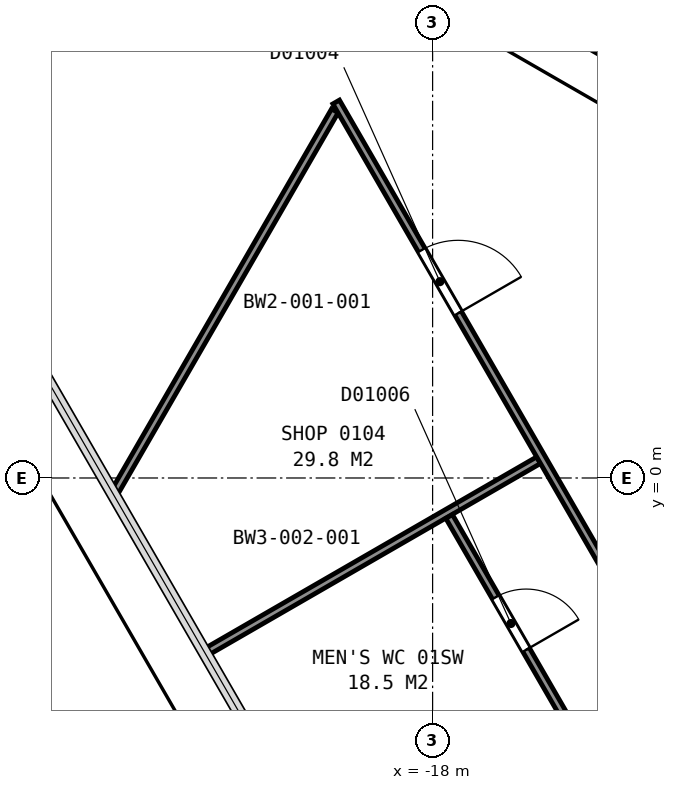
"""IFC4 building model, lengths in metres.
Left out: names, types, materials, properties, quantities, classifications, styles, units other than length and angle.
Written with IfcOpenShell. Run it as: python <this file> out.ifc"""

import sys

from ifc_helpers import new_model, si_unit, direction, frame, frame_2d, origin, place, context, subcontext, project, spatial, rectangle, extrude, element, fill, save


model = new_model("IFC4")
c1 = context("Model", 3, precision=1e-05, world=origin(), true_north=direction((0.0, 1.0)))
c2 = subcontext(c1, "Body", "Model", "MODEL_VIEW")
j1 = project(units=[si_unit("LENGTHUNIT", "METRE"), si_unit("PLANEANGLEUNIT", "RADIAN")], contexts=[c1])
p1 = place(None, origin())
s1 = spatial("IfcSite", under=j1, at=p1, CompositionType="ELEMENT")
p2 = place(p1, origin())
s2 = spatial("IfcBuilding", under=s1, at=p2, CompositionType="ELEMENT")
p3 = place(p2, frame((0.0, 0.0, 12.0)))
s3 = spatial("IfcBuildingStorey", under=s2, at=p3, CompositionType="ELEMENT", Elevation=12.0)
for number, where, z_axis, x_axis in (
    (1, (-7.678, 2.701, 0.0), (0.0, 0.0, 1.0), (-0.866, 0.5, 0.0)),
    (2, (-6.178, 5.299, 0.0), (0.0, 0.0, 1.0), (-0.866, 0.5, 0.0)),
):
    element("IfcWall", number, at=place(p3, frame(where, z_axis=z_axis, x_axis=x_axis)), inside=s3, PredefinedType="PARTITIONING", context=c2, shape_type="SweptSolid", body=[
        extrude(rectangle(XDim=12.0, YDim=0.2, at=frame_2d((6.0, 0.0))), origin(), (0.0, 0.0, 1.0), 5.15),
    ])
p4 = place(p3, frame((-23.25, -0.27, 0.0), z_axis=(0.0, 0.0, 1.0), x_axis=(0.500002873931, 0.866023744513, 0.0)))
e3 = element("IfcWall", 3, at=p4, inside=s3, PredefinedType="PARTITIONING", context=c2, shape_type="SweptSolid", body=[
    extrude(rectangle(XDim=7.285, YDim=0.125, at=frame_2d((3.643, 0.0))), origin(), (0.0, 0.0, 1.0), 5.24),
])
p5 = place(p3, frame((-21.746, -2.875, 0.0), z_axis=(0.0, 0.0, 1.0), x_axis=(0.866118237319, 0.499839173118, 0.0)))
e4 = element("IfcWall", 4, at=p5, inside=s3, PredefinedType="PARTITIONING", context=c2, shape_type="SweptSolid", body=[
    extrude(rectangle(XDim=6.337, YDim=0.125, at=frame_2d((3.169, 0.0))), origin(), (0.0, 0.0, 1.0), 4.253),
])
p6 = place(p3, frame((-4.438, -20.054, 0.0), z_axis=(0.0, 0.0, 1.0), x_axis=(-0.499994028088, 0.866028851642, 0.0)))
e5 = element("IfcWall", 5, at=p6, inside=s3, PredefinedType="PARTITIONING", context=c2, shape_type="SweptSolid", body=[
    extrude(rectangle(XDim=30.297, YDim=0.125, at=frame_2d((15.148, 0.0))), origin(), (0.0, 0.0, 1.0), 4.253),
])
p7 = place(p6, frame((26.285, 0.0, 0.0)))
e6 = element("IfcOpeningElement", 6, at=p7, cuts=e5, PredefinedType="OPENING", context=c2, shape_type="SweptSolid", body=[
    extrude(rectangle(XDim=1.2, YDim=2.1, at=frame_2d((0.6, 1.05))), frame((0.0, 0.073, 0.0), z_axis=(0.0, -1.0, 0.0), x_axis=(1.0, 0.0, 0.0)), (0.0, 0.0, 1.0), 0.145),
])
p8 = place(p6, frame((16.731, 0.0, 0.0)))
e7 = element("IfcOpeningElement", 7, at=p8, cuts=e5, PredefinedType="OPENING", context=c2, shape_type="SweptSolid", body=[
    extrude(rectangle(XDim=1.0, YDim=2.1, at=frame_2d((0.5, 1.05))), frame((0.0, 0.073, 0.0), z_axis=(0.0, -1.0, 0.0), x_axis=(1.0, 0.0, 0.0)), (0.0, 0.0, 1.0), 0.145),
])
p9 = place(p6, frame((8.257, 0.0, 0.0)))
e8 = element("IfcOpeningElement", 8, at=p9, cuts=e5, PredefinedType="OPENING", context=c2, shape_type="SweptSolid", body=[
    extrude(rectangle(XDim=1.2, YDim=2.1, at=frame_2d((0.6, 1.05))), frame((0.0, 0.073, 0.0), z_axis=(0.0, -1.0, 0.0), x_axis=(1.0, 0.0, 0.0)), (0.0, 0.0, 1.0), 0.145),
])
p10 = place(p6, frame((2.916, 0.0, 0.0)))
e9 = element("IfcOpeningElement", 9, at=p10, cuts=e5, PredefinedType="OPENING", context=c2, shape_type="SweptSolid", body=[
    extrude(rectangle(XDim=1.0, YDim=2.1, at=frame_2d((0.5, 1.05))), frame((0.0, 0.073, 0.0), z_axis=(0.0, -1.0, 0.0), x_axis=(1.0, 0.0, 0.0)), (0.0, 0.0, 1.0), 0.145),
])
p11 = place(p3, frame((-11.506, -11.411, 0.0), z_axis=(0.0, 0.0, 1.0), x_axis=(-0.499977189168, 0.866038573224, 0.0)))
e10 = element("IfcWall", 10, at=p11, inside=s3, PredefinedType="PARTITIONING", context=c2, shape_type="SweptSolid", body=[
    extrude(rectangle(XDim=12.444, YDim=0.125, at=frame_2d((6.222, 0.0))), origin(), (0.0, 0.0, 1.0), 5.24),
])
p12 = place(p11, frame((9.912, 0.0, 0.0)))
e11 = element("IfcOpeningElement", 11, at=p12, cuts=e10, PredefinedType="OPENING", context=c2, shape_type="SweptSolid", body=[
    extrude(rectangle(XDim=1.0, YDim=2.1, at=frame_2d((0.5, 1.05))), frame((0.0, 0.073, 0.0), z_axis=(0.0, -1.0, 0.0), x_axis=(1.0, 0.0, 0.0)), (0.0, 0.0, 1.0), 0.145),
])
p13 = place(p11, frame((5.72, 0.0, 0.0)))
e12 = element("IfcOpeningElement", 12, at=p13, cuts=e10, PredefinedType="OPENING", context=c2, shape_type="SweptSolid", body=[
    extrude(rectangle(XDim=1.0, YDim=2.1, at=frame_2d((0.5, 1.05))), frame((0.0, 0.073, 0.0), z_axis=(0.0, -1.0, 0.0), x_axis=(1.0, 0.0, 0.0)), (0.0, 0.0, 1.0), 0.145),
])
p14 = place(p11, frame((1.529, 0.0, 0.0)))
e13 = element("IfcOpeningElement", 13, at=p14, cuts=e10, PredefinedType="OPENING", context=c2, shape_type="SweptSolid", body=[
    extrude(rectangle(XDim=1.0, YDim=2.1, at=frame_2d((0.5, 1.05))), frame((0.0, 0.073, 0.0), z_axis=(0.0, -1.0, 0.0), x_axis=(1.0, 0.0, 0.0)), (0.0, 0.0, 1.0), 0.145),
])
p15 = place(p7, origin())
e14 = element("IfcDoor", 14, at=p15, inside=s3, OperationType="SINGLE_SWING_LEFT", PredefinedType="DOOR", context=c2, shape_type="SweptSolid", body=[
    extrude(rectangle(XDim=1.2, YDim=2.1, at=frame_2d((0.6, 1.05))), frame((0.0, 0.025, 0.0), z_axis=(0.0, -1.0, 0.0), x_axis=(1.0, 0.0, 0.0)), (0.0, 0.0, 1.0), 0.05),
])
fill(e6, e14)
p16 = place(p12, origin())
e15 = element("IfcDoor", 15, at=p16, inside=s3, OperationType="SINGLE_SWING_LEFT", PredefinedType="DOOR", context=c2, shape_type="SweptSolid", body=[
    extrude(rectangle(XDim=1.0, YDim=2.1, at=frame_2d((0.5, 1.05))), frame((0.0, 0.025, 0.0), z_axis=(0.0, -1.0, 0.0), x_axis=(1.0, 0.0, 0.0)), (0.0, 0.0, 1.0), 0.05),
])
fill(e11, e15)
save(model, sys.argv[1])
